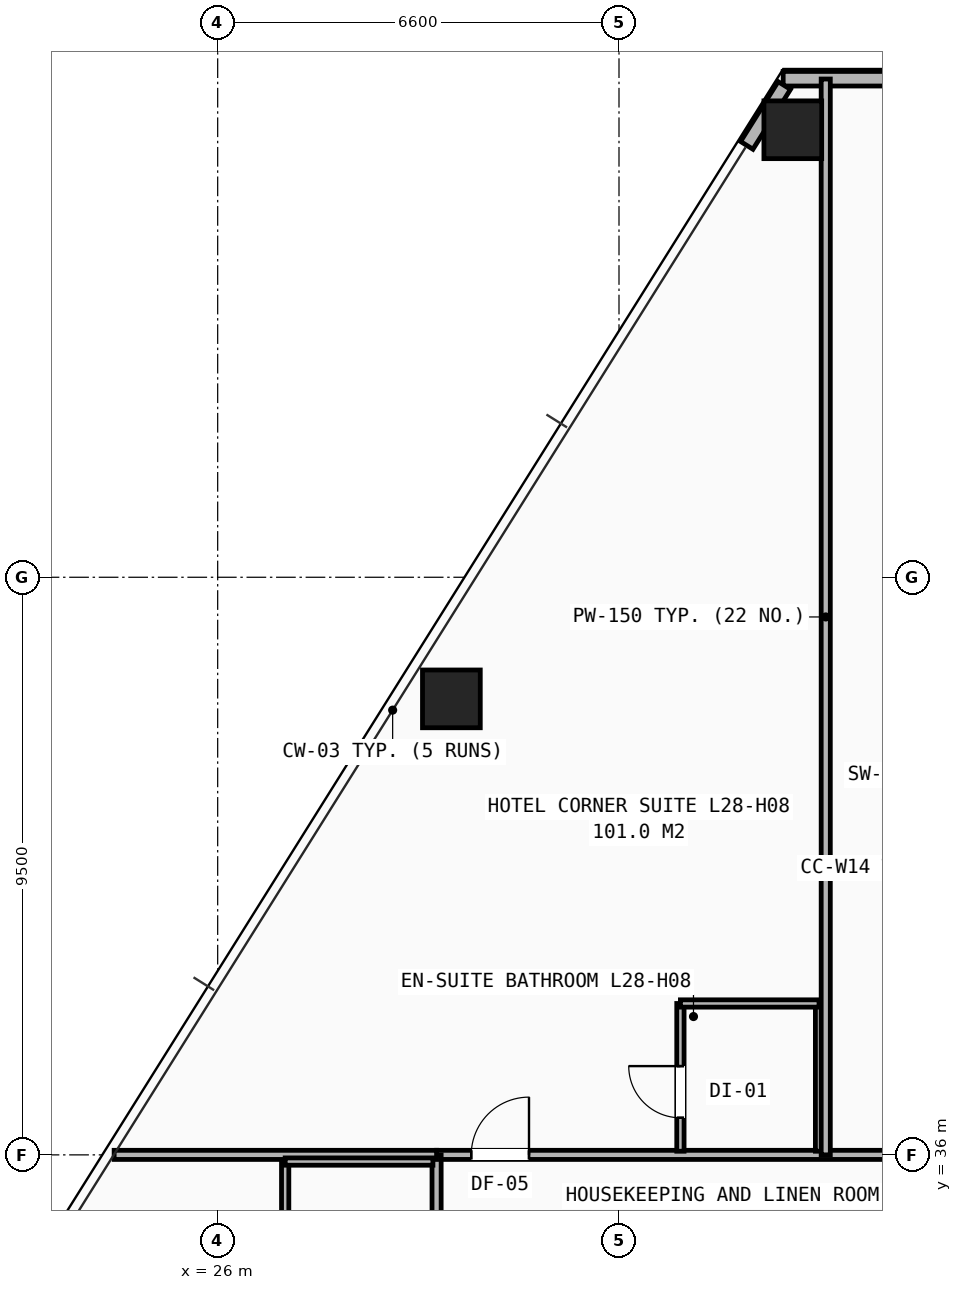
"""IFC4 building model, lengths in metres.
Left out: names, types, materials, properties, quantities, classifications, styles, units other than length and angle.
Written with IfcOpenShell. Run it as: python <this file> out.ifc"""

import sys

from ifc_helpers import new_model, si_unit, direction, frame, frame_2d, origin, origin_2d, place, context, subcontext, project, spatial, rectangle, hollow_rectangle, extrude, element, fill, save


model = new_model("IFC4")
c1 = context("Model", 3, precision=1e-05, world=origin(), true_north=direction((0.0, 1.0)))
c2 = subcontext(c1, "Body", "Model", "MODEL_VIEW")
j1 = project(units=[si_unit("LENGTHUNIT", "METRE"), si_unit("PLANEANGLEUNIT", "RADIAN")], contexts=[c1])
p1 = place(None, origin())
s1 = spatial("IfcSite", under=j1, at=p1, CompositionType="ELEMENT")
p2 = place(p1, origin())
s2 = spatial("IfcBuilding", under=s1, at=p2, CompositionType="ELEMENT")
p3 = place(p2, frame((0.0, 0.0, 99.0)))
s3 = spatial("IfcBuildingStorey", under=s2, at=p3, CompositionType="ELEMENT", Elevation=99.0)
for number, where, z_axis, x_axis in (
    (1, (35.458, 52.86, 0.0), (0.0, 0.0, 1.0), (1.0, 0.0, 0.0)),
    (2, (29.844, 43.5, 0.0), (0.0, 0.0, 1.0), (1.0, 0.0, 0.0)),
):
    element("IfcColumn", number, at=place(p3, frame(where, z_axis=z_axis, x_axis=x_axis)), inside=s3, PredefinedType="COLUMN", context=c2, shape_type="SweptSolid", body=[
        extrude(hollow_rectangle(XDim=0.95, YDim=0.95, WallThickness=0.065, at=origin_2d()), origin(), (0.0, 0.0, 1.0), 3.2),
    ])
p4 = place(p3, frame((35.3, 53.699, 0.0), z_axis=(0.0, 0.0, 1.0), x_axis=(1.0, 0.0, 0.0)))
e3 = element("IfcWall", 3, at=p4, inside=s3, PredefinedType="SHEAR", context=c2, shape_type="SweptSolid", body=[
    extrude(rectangle(XDim=9.4, YDim=0.24, at=frame_2d((4.7, 0.0))), origin(), (0.0, 0.0, 1.0), 2.253),
])
p5 = place(p3, frame((35.319, 53.588, 0.0), z_axis=(0.0, 0.0, 1.0), x_axis=(-0.531168946151, -0.847265926758, 0.0)))
e4 = element("IfcWall", 4, at=p5, inside=s3, PredefinedType="SHEAR", context=c2, shape_type="SweptSolid", body=[
    extrude(rectangle(XDim=1.162, YDim=0.24, at=frame_2d((0.581, 0.0))), origin(), (0.0, 0.0, 1.0), 2.253),
])
p6 = place(p3, frame((29.6, 36.0, 0.0), z_axis=(0.0, 0.0, 1.0), x_axis=(1.0, 0.0, 0.0)))
e5 = element("IfcWall", 5, at=p6, inside=s3, PredefinedType="PARTITIONING", context=c2, shape_type="SweptSolid", body=[
    extrude(rectangle(XDim=9.65, YDim=0.15, at=frame_2d((4.825, 0.0))), origin(), (0.0, 0.0, 1.0), 2.503),
])
p7 = place(p6, frame((0.57, 0.0, 0.0)))
e6 = element("IfcOpeningElement", 6, at=p7, cuts=e5, PredefinedType="OPENING", context=c2, shape_type="SweptSolid", body=[
    extrude(rectangle(XDim=0.95, YDim=2.1, at=frame_2d((0.475, 1.05))), frame((0.0, 0.085, 0.0), z_axis=(0.0, -1.0, 0.0), x_axis=(1.0, 0.0, 0.0)), (0.0, 0.0, 1.0), 0.17),
])
p8 = place(p6, frame((8.02, 0.0, 0.0)))
e7 = element("IfcOpeningElement", 7, at=p8, cuts=e5, PredefinedType="OPENING", context=c2, shape_type="SweptSolid", body=[
    extrude(rectangle(XDim=0.95, YDim=2.1, at=frame_2d((0.475, 1.05))), frame((0.0, 0.085, 0.0), z_axis=(0.0, -1.0, 0.0), x_axis=(1.0, 0.0, 0.0)), (0.0, 0.0, 1.0), 0.17),
])
p9 = place(p3, frame((29.6, 14.1, 0.0), z_axis=(0.0, 0.0, 1.0), x_axis=(0.0, 1.0, 0.0)))
e8 = element("IfcWall", 8, at=p9, inside=s3, PredefinedType="PARTITIONING", context=c2, shape_type="SweptSolid", body=[
    extrude(rectangle(XDim=21.9, YDim=0.15, at=frame_2d((10.95, 0.0))), origin(), (0.0, 0.0, 1.0), 2.181),
])
p10 = place(p9, frame((0.42, 0.0, 0.0)))
e9 = element("IfcOpeningElement", 9, at=p10, cuts=e8, PredefinedType="OPENING", context=c2, shape_type="SweptSolid", body=[
    extrude(rectangle(XDim=0.95, YDim=2.1, at=frame_2d((0.475, 1.05))), frame((0.0, 0.085, 0.0), z_axis=(0.0, -1.0, 0.0), x_axis=(1.0, 0.0, 0.0)), (0.0, 0.0, 1.0), 0.17),
])
p11 = place(p9, frame((6.12, 0.0, 0.0)))
e10 = element("IfcOpeningElement", 10, at=p11, cuts=e8, PredefinedType="OPENING", context=c2, shape_type="SweptSolid", body=[
    extrude(rectangle(XDim=0.95, YDim=2.1, at=frame_2d((0.475, 1.05))), frame((0.0, 0.085, 0.0), z_axis=(0.0, -1.0, 0.0), x_axis=(1.0, 0.0, 0.0)), (0.0, 0.0, 1.0), 0.17),
])
p12 = place(p9, frame((14.12, 0.0, 0.0)))
e11 = element("IfcOpeningElement", 11, at=p12, cuts=e8, PredefinedType="OPENING", context=c2, shape_type="SweptSolid", body=[
    extrude(rectangle(XDim=0.95, YDim=2.1, at=frame_2d((0.475, 1.05))), frame((0.0, 0.085, 0.0), z_axis=(0.0, -1.0, 0.0), x_axis=(1.0, 0.0, 0.0)), (0.0, 0.0, 1.0), 0.17),
])
p13 = place(p3, frame((24.297, 36.0, 0.0), z_axis=(0.0, 0.0, 1.0), x_axis=(1.0, 0.0, 0.0)))
e12 = element("IfcWall", 12, at=p13, inside=s3, PredefinedType="PARTITIONING", context=c2, shape_type="SweptSolid", body=[
    extrude(rectangle(XDim=5.303, YDim=0.15, at=frame_2d((2.651, 0.0))), origin(), (0.0, 0.0, 1.0), 2.258),
])
p14 = place(p3, frame((27.11, 33.61, 0.0), z_axis=(0.0, 0.0, 1.0), x_axis=(0.0, 1.0, 0.0)))
e13 = element("IfcWall", 13, at=p14, inside=s3, PredefinedType="PARTITIONING", context=c2, shape_type="SweptSolid", body=[
    extrude(rectangle(XDim=2.28, YDim=0.12, at=frame_2d((1.14, 0.0))), origin(), (0.0, 0.0, 1.0), 2.97),
])
p15 = place(p3, frame((27.11, 35.89, 0.0), z_axis=(0.0, 0.0, 1.0), x_axis=(1.0, 0.0, 0.0)))
e14 = element("IfcWall", 14, at=p15, inside=s3, PredefinedType="PARTITIONING", context=c2, shape_type="SweptSolid", body=[
    extrude(rectangle(XDim=2.43, YDim=0.12, at=frame_2d((1.215, 0.0))), origin(), (0.0, 0.0, 1.0), 2.503),
])
p16 = place(p3, frame((33.61, 36.06, 0.0), z_axis=(0.0, 0.0, 1.0), x_axis=(0.0, 1.0, 0.0)))
e15 = element("IfcWall", 15, at=p16, inside=s3, PredefinedType="PARTITIONING", context=c2, shape_type="SweptSolid", body=[
    extrude(rectangle(XDim=2.43, YDim=0.12, at=frame_2d((1.215, 0.0))), origin(), (0.0, 0.0, 1.0), 2.97),
])
p17 = place(p16, frame((0.55, 0.0, 0.0)))
e16 = element("IfcOpeningElement", 16, at=p17, cuts=e15, PredefinedType="OPENING", context=c2, shape_type="SweptSolid", body=[
    extrude(rectangle(XDim=0.85, YDim=2.05, at=frame_2d((0.425, 1.025))), frame((0.0, 0.07, 0.0), z_axis=(0.0, -1.0, 0.0), x_axis=(1.0, 0.0, 0.0)), (0.0, 0.0, 1.0), 0.14),
])
p18 = place(p3, frame((35.89, 36.06, 0.0), z_axis=(0.0, 0.0, 1.0), x_axis=(0.0, 1.0, 0.0)))
e17 = element("IfcWall", 17, at=p18, inside=s3, PredefinedType="PARTITIONING", context=c2, shape_type="SweptSolid", body=[
    extrude(rectangle(XDim=2.43, YDim=0.12, at=frame_2d((1.215, 0.0))), origin(), (0.0, 0.0, 1.0), 2.97),
])
p19 = place(p3, frame((33.61, 38.49, 0.0), z_axis=(0.0, 0.0, 1.0), x_axis=(1.0, 0.0, 0.0)))
e18 = element("IfcWall", 18, at=p19, inside=s3, PredefinedType="PARTITIONING", context=c2, shape_type="SweptSolid", body=[
    extrude(rectangle(XDim=2.28, YDim=0.12, at=frame_2d((1.14, 0.0))), origin(), (0.0, 0.0, 1.0), 2.97),
])
p20 = place(p3, frame((36.0, 36.0, 0.0), z_axis=(0.0, 0.0, 1.0), x_axis=(0.0, 1.0, 0.0)))
e19 = element("IfcWall", 19, at=p20, inside=s3, PredefinedType="PARTITIONING", context=c2, shape_type="SweptSolid", body=[
    extrude(rectangle(XDim=17.694, YDim=0.15, at=frame_2d((8.847, 0.0))), origin(), (0.0, 0.0, 1.0), 2.181),
])
p21 = place(p7, origin())
e20 = element("IfcDoor", 20, at=p21, inside=s3, OperationType="SINGLE_SWING_RIGHT", PredefinedType="DOOR", context=c2, shape_type="SweptSolid", body=[
    extrude(rectangle(XDim=0.95, YDim=2.1, at=frame_2d((0.475, 1.05))), frame((0.0, 0.025, 0.0), z_axis=(0.0, -1.0, 0.0), x_axis=(1.0, 0.0, 0.0)), (0.0, 0.0, 1.0), 0.05),
])
fill(e6, e20)
p22 = place(p17, origin())
e21 = element("IfcDoor", 21, at=p22, inside=s3, OperationType="SINGLE_SWING_RIGHT", PredefinedType="DOOR", context=c2, shape_type="SweptSolid", body=[
    extrude(rectangle(XDim=0.85, YDim=2.05, at=frame_2d((0.425, 1.025))), frame((0.0, 0.025, 0.0), z_axis=(0.0, -1.0, 0.0), x_axis=(1.0, 0.0, 0.0)), (0.0, 0.0, 1.0), 0.05),
])
fill(e16, e21)
save(model, sys.argv[1])
